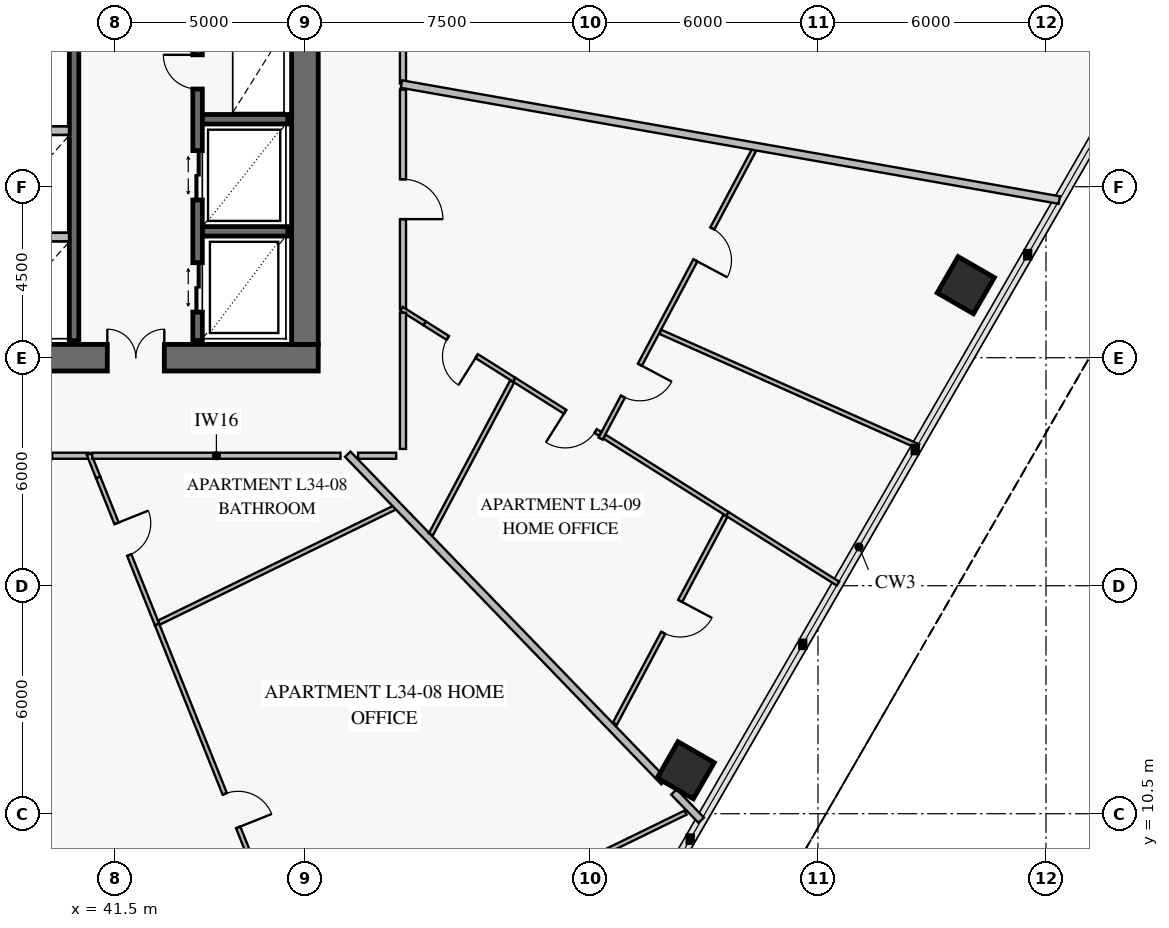
"""IFC4 building model, lengths in metres.
Left out: names, types, materials, properties, quantities, classifications, styles, units other than length and angle.
Written with IfcOpenShell. Run it as: python <this file> out.ifc"""

import sys

from ifc_helpers import new_model, si_unit, direction, frame, frame_2d, origin, origin_2d, place, context, subcontext, project, spatial, rectangle, extrude, element, fill, save


model = new_model("IFC4")
c1 = context("Model", 3, precision=1e-05, world=origin(), true_north=direction((0.0, 1.0)))
c2 = subcontext(c1, "Body", "Model", "MODEL_VIEW")
j1 = project(units=[si_unit("LENGTHUNIT", "METRE"), si_unit("PLANEANGLEUNIT", "RADIAN")], contexts=[c1])
p1 = place(None, origin())
s1 = spatial("IfcSite", under=j1, at=p1, CompositionType="ELEMENT")
p2 = place(p1, origin())
s2 = spatial("IfcBuilding", under=s1, at=p2, CompositionType="ELEMENT")
p3 = place(p2, frame((0.0, 0.0, 138.0)))
s3 = spatial("IfcBuildingStorey", under=s2, at=p3, CompositionType="ELEMENT", Elevation=138.0)
p4 = place(p3, frame((37.35, 22.5, 0.0), z_axis=(0.0, 0.0, 1.0), x_axis=(1.0, 0.0, 0.0)))
e1 = element("IfcWall", 1, at=p4, inside=s3, PredefinedType="SHEAR", context=c2, shape_type="SweptSolid", body=[
    extrude(rectangle(XDim=9.5, YDim=0.7, at=frame_2d((4.75, 0.0))), origin(), (0.0, 0.0, 1.0), 3.8),
])
p5 = place(p4, frame((3.95, 0.0, 0.0)))
e2 = element("IfcOpeningElement", 2, at=p5, cuts=e1, PredefinedType="OPENING", context=c2, shape_type="SweptSolid", body=[
    extrude(rectangle(XDim=1.5, YDim=2.15, at=frame_2d((0.75, 1.075))), frame((0.0, 0.362, 0.0), z_axis=(0.0, -1.0, 0.0), x_axis=(1.0, 0.0, 0.0)), (0.0, 0.0, 1.0), 0.724),
])
p6 = place(p3, frame((46.5, 22.85, 0.0), z_axis=(0.0, 0.0, 1.0), x_axis=(0.0, 1.0, 0.0)))
e3 = element("IfcWall", 3, at=p6, inside=s3, PredefinedType="SHEAR", context=c2, shape_type="SweptSolid", body=[
    extrude(rectangle(XDim=18.3, YDim=0.7, at=frame_2d((9.15, 0.0))), origin(), (0.0, 0.0, 1.0), 3.8),
])
p7 = place(p6, frame((8.9, 0.0, 0.0)))
e4 = element("IfcOpeningElement", 4, at=p7, cuts=e3, PredefinedType="OPENING", context=c2, shape_type="SweptSolid", body=[
    extrude(rectangle(XDim=1.1, YDim=2.15, at=frame_2d((0.55, 1.075))), frame((0.0, 0.362, 0.0), z_axis=(0.0, -1.0, 0.0), x_axis=(1.0, 0.0, 0.0)), (0.0, 0.0, 1.0), 0.724),
])
for number, where, z_axis, x_axis in (
    (5, (56.519, 11.643, 0.0), (0.0, 0.0, 1.0), (0.5, 0.866, 0.0)),
    (6, (63.889, 24.408, 0.0), (0.0, 0.0, 1.0), (0.5, 0.866, 0.0)),
):
    element("IfcColumn", number, at=place(p3, frame(where, z_axis=z_axis, x_axis=x_axis)), inside=s3, PredefinedType="COLUMN", context=c2, shape_type="SweptSolid", body=[
        extrude(rectangle(XDim=1.1, YDim=1.1, at=origin_2d()), origin(), (0.0, 0.0, 1.0), 3.55),
    ])
p8 = place(p3, frame((40.425, 22.95, 0.0), z_axis=(0.0, 0.0, 1.0), x_axis=(0.0, 1.0, 0.0)))
e7 = element("IfcWall", 7, at=p8, inside=s3, PredefinedType="SOLIDWALL", context=c2, shape_type="SweptSolid", body=[
    extrude(rectangle(XDim=8.2, YDim=0.25, at=frame_2d((4.1, 0.0))), origin(), (0.0, 0.0, 1.0), 3.8),
])
for number, where, z_axis, x_axis in (
    (8, (43.8, 25.825, 0.0), (0.0, 0.0, 1.0), (1.0, 0.0, 0.0)),
    (9, (43.8, 28.775, 0.0), (0.0, 0.0, 1.0), (1.0, 0.0, 0.0)),
):
    element("IfcWall", number, at=place(p3, frame(where, z_axis=z_axis, x_axis=x_axis)), inside=s3, PredefinedType="SOLIDWALL", context=c2, shape_type="SweptSolid", body=[
        extrude(rectangle(XDim=2.25, YDim=0.25, at=frame_2d((1.125, 0.0))), origin(), (0.0, 0.0, 1.0), 3.8),
    ])
p9 = place(p3, frame((43.675, 22.95, 0.0), z_axis=(0.0, 0.0, 1.0), x_axis=(0.0, 1.0, 0.0)))
e10 = element("IfcWall", 10, at=p9, inside=s3, PredefinedType="SOLIDWALL", context=c2, shape_type="SweptSolid", body=[
    extrude(rectangle(XDim=8.2, YDim=0.25, at=frame_2d((4.1, 0.0))), origin(), (0.0, 0.0, 1.0), 3.8),
])
p10 = place(p9, frame((0.75, 0.0, 0.0)))
e11 = element("IfcOpeningElement", 11, at=p10, cuts=e10, PredefinedType="OPENING", context=c2, shape_type="SweptSolid", body=[
    extrude(rectangle(XDim=1.3, YDim=2.3, at=frame_2d((0.65, 1.15))), frame((0.0, 0.137, 0.0), z_axis=(0.0, -1.0, 0.0), x_axis=(1.0, 0.0, 0.0)), (0.0, 0.0, 1.0), 0.274),
])
p11 = place(p9, frame((3.7, 0.0, 0.0)))
e12 = element("IfcOpeningElement", 12, at=p11, cuts=e10, PredefinedType="OPENING", context=c2, shape_type="SweptSolid", body=[
    extrude(rectangle(XDim=1.3, YDim=2.3, at=frame_2d((0.65, 1.15))), frame((0.0, 0.137, 0.0), z_axis=(0.0, -1.0, 0.0), x_axis=(1.0, 0.0, 0.0)), (0.0, 0.0, 1.0), 0.274),
])
p12 = place(p9, frame((6.62, 0.0, 0.0)))
e13 = element("IfcOpeningElement", 13, at=p12, cuts=e10, PredefinedType="OPENING", context=c2, shape_type="SweptSolid", body=[
    extrude(rectangle(XDim=0.9, YDim=2.1, at=frame_2d((0.45, 1.05))), frame((0.0, 0.137, 0.0), z_axis=(0.0, -1.0, 0.0), x_axis=(1.0, 0.0, 0.0)), (0.0, 0.0, 1.0), 0.274),
])
p13 = place(p3, frame((41.06, 19.35, 0.0), z_axis=(0.0, 0.0, 1.0), x_axis=(0.371320023402, -0.928504948948, 0.0)))
e14 = element("IfcWall", 14, at=p13, inside=s3, PredefinedType="PARTITIONING", context=c2, shape_type="SweptSolid", body=[
    extrude(rectangle(XDim=4.17, YDim=0.12, at=frame_2d((2.085, 0.0))), origin(), (0.0, 0.0, 1.0), 3.55),
])
p14 = place(p13, frame((1.302, 0.0, 0.0)))
e15 = element("IfcOpeningElement", 15, at=p14, cuts=e14, PredefinedType="OPENING", context=c2, shape_type="SweptSolid", body=[
    extrude(rectangle(XDim=0.9, YDim=2.1, at=frame_2d((0.45, 1.05))), frame((0.0, 0.072, 0.0), z_axis=(0.0, -1.0, 0.0), x_axis=(1.0, 0.0, 0.0)), (0.0, 0.0, 1.0), 0.144),
])
p15 = place(p3, frame((42.608, 15.478, 0.0), z_axis=(0.0, 0.0, 1.0), x_axis=(0.371370817249, -0.928484634281, 0.0)))
e16 = element("IfcWall", 16, at=p15, inside=s3, PredefinedType="PARTITIONING", context=c2, shape_type="SweptSolid", body=[
    extrude(rectangle(XDim=10.598, YDim=0.12, at=frame_2d((5.299, 0.0))), origin(), (0.0, 0.0, 1.0), 2.8),
])
p16 = place(p15, frame((4.799, 0.0, 0.0)))
e17 = element("IfcOpeningElement", 17, at=p16, cuts=e16, PredefinedType="OPENING", context=c2, shape_type="SweptSolid", body=[
    extrude(rectangle(XDim=0.95, YDim=2.1, at=frame_2d((0.475, 1.05))), frame((0.0, 0.072, 0.0), z_axis=(0.0, -1.0, 0.0), x_axis=(1.0, 0.0, 0.0)), (0.0, 0.0, 1.0), 0.144),
])
p17 = place(p3, frame((46.596, 5.691, 0.0), z_axis=(0.0, 0.0, 1.0), x_axis=(0.898799700949, 0.438359552848, 0.0)))
e18 = element("IfcWall", 18, at=p17, inside=s3, PredefinedType="PARTITIONING", context=c2, shape_type="SweptSolid", body=[
    extrude(rectangle(XDim=11.035, YDim=0.12, at=frame_2d((5.517, 0.0))), origin(), (0.0, 0.0, 1.0), 2.8),
])
p18 = place(p17, frame((4.958, 0.0, 0.0)))
e19 = element("IfcOpeningElement", 19, at=p18, cuts=e18, PredefinedType="OPENING", context=c2, shape_type="SweptSolid", body=[
    extrude(rectangle(XDim=0.95, YDim=2.1, at=frame_2d((0.475, 1.05))), frame((0.0, 0.072, 0.0), z_axis=(0.0, -1.0, 0.0), x_axis=(1.0, 0.0, 0.0)), (0.0, 0.0, 1.0), 0.144),
])
p19 = place(p3, frame((37.826, 19.92, 0.0), z_axis=(0.0, 0.0, 1.0), x_axis=(1.0, 0.0, 0.0)))
e20 = element("IfcWall", 20, at=p19, inside=s3, PredefinedType="PARTITIONING", context=c2, shape_type="SweptSolid", body=[
    extrude(rectangle(XDim=2.984, YDim=0.16, at=frame_2d((1.492, 0.0))), origin(), (0.0, 0.0, 1.0), 2.85),
])
p20 = place(p19, frame((0.967, 0.0, 0.0)))
e21 = element("IfcOpeningElement", 21, at=p20, cuts=e20, PredefinedType="OPENING", context=c2, shape_type="SweptSolid", body=[
    extrude(rectangle(XDim=1.05, YDim=2.15, at=frame_2d((0.525, 1.075))), frame((0.0, 0.092, 0.0), z_axis=(0.0, -1.0, 0.0), x_axis=(1.0, 0.0, 0.0)), (0.0, 0.0, 1.0), 0.184),
])
p21 = place(p3, frame((54.28, 20.371, 0.0), z_axis=(0.0, 0.0, 1.0), x_axis=(0.469462335531, 0.882952499015, 0.0)))
e22 = element("IfcWall", 22, at=p21, inside=s3, PredefinedType="PARTITIONING", context=c2, shape_type="SweptSolid", body=[
    extrude(rectangle(XDim=8.602, YDim=0.12, at=frame_2d((4.301, 0.0))), origin(), (0.0, 0.0, 1.0), 2.85),
])
p22 = place(p21, frame((1.252, 0.0, 0.0)))
e23 = element("IfcOpeningElement", 23, at=p22, cuts=e22, PredefinedType="OPENING", context=c2, shape_type="SweptSolid", body=[
    extrude(rectangle(XDim=0.95, YDim=2.1, at=frame_2d((0.475, 1.05))), frame((0.0, 0.072, 0.0), z_axis=(0.0, -1.0, 0.0), x_axis=(1.0, 0.0, 0.0)), (0.0, 0.0, 1.0), 0.144),
])
p23 = place(p21, frame((5.313, 0.0, 0.0)))
e24 = element("IfcOpeningElement", 24, at=p23, cuts=e22, PredefinedType="OPENING", context=c2, shape_type="SweptSolid", body=[
    extrude(rectangle(XDim=0.95, YDim=2.1, at=frame_2d((0.475, 1.05))), frame((0.0, 0.072, 0.0), z_axis=(0.0, -1.0, 0.0), x_axis=(1.0, 0.0, 0.0)), (0.0, 0.0, 1.0), 0.144),
])
p24 = place(p3, frame((49.65, 23.404, 0.0), z_axis=(0.0, 0.0, 1.0), x_axis=(0.846190371544, -0.532880713769, 0.0)))
e25 = element("IfcWall", 25, at=p24, inside=s3, PredefinedType="PARTITIONING", context=c2, shape_type="SweptSolid", body=[
    extrude(rectangle(XDim=2.784, YDim=0.12, at=frame_2d((1.392, 0.0))), origin(), (0.0, 0.0, 1.0), 3.55),
])
p25 = place(p24, frame((0.719, 0.0, 0.0)))
e26 = element("IfcOpeningElement", 26, at=p25, cuts=e25, PredefinedType="OPENING", context=c2, shape_type="SweptSolid", body=[
    extrude(rectangle(XDim=0.9, YDim=2.1, at=frame_2d((0.45, 1.05))), frame((0.0, 0.072, 0.0), z_axis=(0.0, -1.0, 0.0), x_axis=(1.0, 0.0, 0.0)), (0.0, 0.0, 1.0), 0.144),
])
p26 = place(p3, frame((52.006, 21.921, 0.0), z_axis=(0.0, 0.0, 1.0), x_axis=(0.846193199802, -0.532876222596, 0.0)))
e27 = element("IfcWall", 27, at=p26, inside=s3, PredefinedType="PARTITIONING", context=c2, shape_type="SweptSolid", body=[
    extrude(rectangle(XDim=2.674, YDim=0.12, at=frame_2d((1.337, 0.0))), origin(), (0.0, 0.0, 1.0), 3.1),
])
p27 = place(p26, frame((1.584, 0.0, 0.0)))
e28 = element("IfcOpeningElement", 28, at=p27, cuts=e27, PredefinedType="OPENING", context=c2, shape_type="SweptSolid", body=[
    extrude(rectangle(XDim=0.95, YDim=2.1, at=frame_2d((0.475, 1.05))), frame((0.0, 0.072, 0.0), z_axis=(0.0, -1.0, 0.0), x_axis=(1.0, 0.0, 0.0)), (0.0, 0.0, 1.0), 0.144),
])
p28 = place(p3, frame((54.384, 20.423, 0.0), z_axis=(0.0, 0.0, 1.0), x_axis=(0.846198695146, -0.532867496037, 0.0)))
e29 = element("IfcWall", 29, at=p28, inside=s3, PredefinedType="PARTITIONING", context=c2, shape_type="SweptSolid", body=[
    extrude(rectangle(XDim=3.821, YDim=0.12, at=frame_2d((1.911, 0.0))), origin(), (0.0, 0.0, 1.0), 3.55),
])
p29 = place(p3, frame((54.657, 12.872, 0.0), z_axis=(0.0, 0.0, 1.0), x_axis=(0.469450167382, 0.882958968664, 0.0)))
e30 = element("IfcWall", 30, at=p29, inside=s3, PredefinedType="PARTITIONING", context=c2, shape_type="SweptSolid", body=[
    extrude(rectangle(XDim=6.193, YDim=0.12, at=frame_2d((3.096, 0.0))), origin(), (0.0, 0.0, 1.0), 2.85),
])
p30 = place(p29, frame((2.706, 0.0, 0.0)))
e31 = element("IfcOpeningElement", 31, at=p30, cuts=e30, PredefinedType="OPENING", context=c2, shape_type="SweptSolid", body=[
    extrude(rectangle(XDim=0.95, YDim=2.1, at=frame_2d((0.475, 1.05))), frame((0.0, 0.072, 0.0), z_axis=(0.0, -1.0, 0.0), x_axis=(1.0, 0.0, 0.0)), (0.0, 0.0, 1.0), 0.144),
])
p31 = place(p3, frame((49.08, 23.787, 0.0), z_axis=(0.0, 0.0, 1.0), x_axis=(0.0, 1.0, 0.0)))
e32 = element("IfcWall", 32, at=p31, inside=s3, PredefinedType="PARTITIONING", context=c2, shape_type="SweptSolid", body=[
    extrude(rectangle(XDim=5.769, YDim=0.16, at=frame_2d((2.884, 0.0))), origin(), (0.0, 0.0, 1.0), 2.85),
])
p32 = place(p31, frame((2.359, 0.0, 0.0)))
e33 = element("IfcOpeningElement", 33, at=p32, cuts=e32, PredefinedType="OPENING", context=c2, shape_type="SweptSolid", body=[
    extrude(rectangle(XDim=1.05, YDim=2.15, at=frame_2d((0.525, 1.075))), frame((0.0, 0.092, 0.0), z_axis=(0.0, -1.0, 0.0), x_axis=(1.0, 0.0, 0.0)), (0.0, 0.0, 1.0), 0.184),
])
p33 = place(p3, frame((49.08, 29.714, 0.0), z_axis=(0.0, 0.0, 1.0), x_axis=(0.0, 1.0, 0.0)))
e34 = element("IfcWall", 34, at=p33, inside=s3, PredefinedType="PARTITIONING", context=c2, shape_type="SweptSolid", body=[
    extrude(rectangle(XDim=8.643, YDim=0.16, at=frame_2d((4.322, 0.0))), origin(), (0.0, 0.0, 1.0), 2.85),
])
p34 = place(p33, frame((3.747, 0.0, 0.0)))
e35 = element("IfcOpeningElement", 35, at=p34, cuts=e34, PredefinedType="OPENING", context=c2, shape_type="SweptSolid", body=[
    extrude(rectangle(XDim=1.15, YDim=2.2, at=frame_2d((0.575, 1.1))), frame((0.0, 0.092, 0.0), z_axis=(0.0, -1.0, 0.0), x_axis=(1.0, 0.0, 0.0)), (0.0, 0.0, 1.0), 0.184),
])
for number, where, z_axis, x_axis in (
    (36, (38.008, 25.675, 0.0), (0.0, 0.0, 1.0), (1.0, 0.0, 0.0)),
    (37, (38.008, 28.475, 0.0), (0.0, 0.0, 1.0), (1.0, 0.0, 0.0)),
):
    element("IfcWall", number, at=place(p3, frame(where, z_axis=z_axis, x_axis=x_axis)), inside=s3, PredefinedType="PARTITIONING", context=c2, shape_type="SweptSolid", body=[
        extrude(rectangle(XDim=2.284, YDim=0.22, at=frame_2d((1.142, 0.0))), origin(), (0.0, 0.0, 1.0), 3.55),
    ])
p35 = place(p3, frame((37.692, 19.96, 0.0), z_axis=(0.0, 0.0, 1.0), x_axis=(0.139170315648, -0.990268460188, 0.0)))
e38 = element("IfcWall", 38, at=p35, inside=s3, PredefinedType="PARTITIONING", context=c2, shape_type="SweptSolid", body=[
    extrude(rectangle(XDim=17.085, YDim=0.2, at=frame_2d((8.542, 0.0))), origin(), (0.0, 0.0, 1.0), 2.8),
])
p36 = place(p3, frame((40.814, 19.963, 0.0), z_axis=(0.0, 0.0, 1.0), x_axis=(0.371581909809, -0.928400174657, 0.0)))
e39 = element("IfcWall", 39, at=p36, inside=s3, PredefinedType="PARTITIONING", context=c2, shape_type="SweptSolid", body=[
    extrude(rectangle(XDim=0.66, YDim=0.12, at=frame_2d((0.33, 0.0))), origin(), (0.0, 0.0, 1.0), 3.55),
])
p37 = place(p3, frame((42.66, 15.531, 0.0), z_axis=(0.0, 0.0, 1.0), x_axis=(0.898796900982, 0.438365293773, 0.0)))
e40 = element("IfcWall", 40, at=p37, inside=s3, PredefinedType="PARTITIONING", context=c2, shape_type="SweptSolid", body=[
    extrude(rectangle(XDim=6.926, YDim=0.12, at=frame_2d((3.463, 0.0))), origin(), (0.0, 0.0, 1.0), 3.55),
])
p38 = place(p3, frame((47.627, 19.96, 0.0), z_axis=(0.0, 0.0, 1.0), x_axis=(0.694659610847, -0.719338602508, 0.0)))
e41 = element("IfcWall", 41, at=p38, inside=s3, PredefinedType="PARTITIONING", context=c2, shape_type="SweptSolid", body=[
    extrude(rectangle(XDim=11.98, YDim=0.2, at=frame_2d((5.99, 0.0))), origin(), (0.0, 0.0, 1.0), 2.8),
])
p39 = place(p3, frame((56.209, 11.073, 0.0), z_axis=(0.0, 0.0, 1.0), x_axis=(0.694716755503, -0.719283413977, 0.0)))
e42 = element("IfcWall", 42, at=p39, inside=s3, PredefinedType="PARTITIONING", context=c2, shape_type="SweptSolid", body=[
    extrude(rectangle(XDim=1.033, YDim=0.2, at=frame_2d((0.517, 0.0))), origin(), (0.0, 0.0, 1.0), 3.55),
])
p40 = place(p3, frame((55.851, 23.181, 0.0), z_axis=(0.0, 0.0, 1.0), x_axis=(0.913861683545, -0.406025643707, 0.0)))
e43 = element("IfcWall", 43, at=p40, inside=s3, PredefinedType="PARTITIONING", context=c2, shape_type="SweptSolid", body=[
    extrude(rectangle(XDim=7.429, YDim=0.12, at=frame_2d((3.714, 0.0))), origin(), (0.0, 0.0, 1.0), 2.8),
])
p41 = place(p3, frame((49.042, 23.787, 0.0), z_axis=(0.0, 0.0, 1.0), x_axis=(0.846312356727, -0.532686957651, 0.0)))
e44 = element("IfcWall", 44, at=p41, inside=s3, PredefinedType="PARTITIONING", context=c2, shape_type="SweptSolid", body=[
    extrude(rectangle(XDim=0.718, YDim=0.12, at=frame_2d((0.359, 0.0))), origin(), (0.0, 0.0, 1.0), 3.55),
])
p42 = place(p3, frame((57.618, 18.387, 0.0), z_axis=(0.0, 0.0, 1.0), x_axis=(0.846190145903, -0.532881072076, 0.0)))
e45 = element("IfcWall", 45, at=p42, inside=s3, PredefinedType="PARTITIONING", context=c2, shape_type="SweptSolid", body=[
    extrude(rectangle(XDim=3.438, YDim=0.12, at=frame_2d((1.719, 0.0))), origin(), (0.0, 0.0, 1.0), 2.8),
])
p43 = place(p3, frame((49.814, 17.851, 0.0), z_axis=(0.0, 0.0, 1.0), x_axis=(0.469430775165, 0.882969278813, 0.0)))
e46 = element("IfcWall", 46, at=p43, inside=s3, PredefinedType="PARTITIONING", context=c2, shape_type="SweptSolid", body=[
    extrude(rectangle(XDim=4.556, YDim=0.12, at=frame_2d((2.278, 0.0))), origin(), (0.0, 0.0, 1.0), 2.85),
])
p44 = place(p3, frame((49.04, 29.701, 0.0), z_axis=(0.0, 0.0, 1.0), x_axis=(0.98480788117, -0.173647450844, 0.0)))
e47 = element("IfcWall", 47, at=p44, inside=s3, PredefinedType="PARTITIONING", context=c2, shape_type="SweptSolid", body=[
    extrude(rectangle(XDim=17.576, YDim=0.2, at=frame_2d((8.788, 0.0))), origin(), (0.0, 0.0, 1.0), 2.8),
])
p45 = place(p3, frame((40.905, 19.92, 0.0), z_axis=(0.0, 0.0, 1.0), x_axis=(1.0, 0.0, 0.0)))
e48 = element("IfcWall", 48, at=p45, inside=s3, PredefinedType="PARTITIONING", context=c2, shape_type="SweptSolid", body=[
    extrude(rectangle(XDim=6.531, YDim=0.16, at=frame_2d((3.266, 0.0))), origin(), (0.0, 0.0, 1.0), 3.55),
])
p46 = place(p3, frame((49.08, 20.1, 0.0), z_axis=(0.0, 0.0, 1.0), x_axis=(0.0, 1.0, 0.0)))
e49 = element("IfcWall", 49, at=p46, inside=s3, PredefinedType="PARTITIONING", context=c2, shape_type="SweptSolid", body=[
    extrude(rectangle(XDim=3.583, YDim=0.16, at=frame_2d((1.792, 0.0))), origin(), (0.0, 0.0, 1.0), 3.55),
])
p47 = place(p3, frame((47.899, 19.92, 0.0), z_axis=(0.0, 0.0, 1.0), x_axis=(1.0, 0.0, 0.0)))
e50 = element("IfcWall", 50, at=p47, inside=s3, PredefinedType="PARTITIONING", context=c2, shape_type="SweptSolid", body=[
    extrude(rectangle(XDim=1.001, YDim=0.16, at=frame_2d((0.5, 0.0))), origin(), (0.0, 0.0, 1.0), 2.85),
])
p48 = place(p5, origin())
e51 = element("IfcDoor", 51, at=p48, inside=s3, OperationType="DOUBLE_DOOR_SINGLE_SWING", PredefinedType="DOOR", context=c2, shape_type="SweptSolid", body=[
    extrude(rectangle(XDim=1.5, YDim=2.15, at=frame_2d((0.75, 1.075))), frame((0.0, 0.025, 0.0), z_axis=(0.0, -1.0, 0.0), x_axis=(1.0, 0.0, 0.0)), (0.0, 0.0, 1.0), 0.05),
])
fill(e2, e51)
p49 = place(p10, origin())
e52 = element("IfcDoor", 52, at=p49, inside=s3, OperationType="DOUBLE_DOOR_SLIDING", PredefinedType="DOOR", context=c2, shape_type="SweptSolid", body=[
    extrude(rectangle(XDim=1.3, YDim=2.3, at=frame_2d((0.65, 1.15))), frame((0.0, 0.025, 0.0), z_axis=(0.0, -1.0, 0.0), x_axis=(1.0, 0.0, 0.0)), (0.0, 0.0, 1.0), 0.05),
])
fill(e11, e52)
p50 = place(p11, origin())
e53 = element("IfcDoor", 53, at=p50, inside=s3, OperationType="DOUBLE_DOOR_SLIDING", PredefinedType="DOOR", context=c2, shape_type="SweptSolid", body=[
    extrude(rectangle(XDim=1.3, YDim=2.3, at=frame_2d((0.65, 1.15))), frame((0.0, 0.025, 0.0), z_axis=(0.0, -1.0, 0.0), x_axis=(1.0, 0.0, 0.0)), (0.0, 0.0, 1.0), 0.05),
])
fill(e12, e53)
p51 = place(p12, origin())
e54 = element("IfcDoor", 54, at=p51, inside=s3, OperationType="SINGLE_SWING_RIGHT", PredefinedType="DOOR", context=c2, shape_type="SweptSolid", body=[
    extrude(rectangle(XDim=0.9, YDim=2.1, at=frame_2d((0.45, 1.05))), frame((0.0, 0.025, 0.0), z_axis=(0.0, -1.0, 0.0), x_axis=(1.0, 0.0, 0.0)), (0.0, 0.0, 1.0), 0.05),
])
fill(e13, e54)
p52 = place(p14, origin())
e55 = element("IfcDoor", 55, at=p52, inside=s3, OperationType="SINGLE_SWING_LEFT", PredefinedType="DOOR", context=c2, shape_type="SweptSolid", body=[
    extrude(rectangle(XDim=0.9, YDim=2.1, at=frame_2d((0.45, 1.05))), frame((0.0, 0.025, 0.0), z_axis=(0.0, -1.0, 0.0), x_axis=(1.0, 0.0, 0.0)), (0.0, 0.0, 1.0), 0.05),
])
fill(e15, e55)
p53 = place(p16, origin())
e56 = element("IfcDoor", 56, at=p53, inside=s3, OperationType="SINGLE_SWING_RIGHT", PredefinedType="DOOR", context=c2, shape_type="SweptSolid", body=[
    extrude(rectangle(XDim=0.95, YDim=2.1, at=frame_2d((0.475, 1.05))), frame((0.0, 0.025, 0.0), z_axis=(0.0, -1.0, 0.0), x_axis=(1.0, 0.0, 0.0)), (0.0, 0.0, 1.0), 0.05),
])
fill(e17, e56)
p54 = place(p22, frame((0.95, 0.0, 0.0), z_axis=(0.0, 0.0, 1.0), x_axis=(-1.0, 0.0, 0.0)))
e57 = element("IfcDoor", 57, at=p54, inside=s3, OperationType="SINGLE_SWING_LEFT", PredefinedType="DOOR", context=c2, shape_type="SweptSolid", body=[
    extrude(rectangle(XDim=0.95, YDim=2.1, at=frame_2d((0.475, 1.05))), frame((0.0, 0.025, 0.0), z_axis=(0.0, -1.0, 0.0), x_axis=(1.0, 0.0, 0.0)), (0.0, 0.0, 1.0), 0.05),
])
fill(e23, e57)
p55 = place(p23, frame((0.95, 0.0, 0.0), z_axis=(0.0, 0.0, 1.0), x_axis=(-1.0, 0.0, 0.0)))
e58 = element("IfcDoor", 58, at=p55, inside=s3, OperationType="SINGLE_SWING_RIGHT", PredefinedType="DOOR", context=c2, shape_type="SweptSolid", body=[
    extrude(rectangle(XDim=0.95, YDim=2.1, at=frame_2d((0.475, 1.05))), frame((0.0, 0.025, 0.0), z_axis=(0.0, -1.0, 0.0), x_axis=(1.0, 0.0, 0.0)), (0.0, 0.0, 1.0), 0.05),
])
fill(e24, e58)
p56 = place(p25, frame((0.9, 0.0, 0.0), z_axis=(0.0, 0.0, 1.0), x_axis=(-1.0, 0.0, 0.0)))
e59 = element("IfcDoor", 59, at=p56, inside=s3, OperationType="SINGLE_SWING_LEFT", PredefinedType="DOOR", context=c2, shape_type="SweptSolid", body=[
    extrude(rectangle(XDim=0.9, YDim=2.1, at=frame_2d((0.45, 1.05))), frame((0.0, 0.025, 0.0), z_axis=(0.0, -1.0, 0.0), x_axis=(1.0, 0.0, 0.0)), (0.0, 0.0, 1.0), 0.05),
])
fill(e26, e59)
p57 = place(p27, frame((0.95, 0.0, 0.0), z_axis=(0.0, 0.0, 1.0), x_axis=(-1.0, 0.0, 0.0)))
e60 = element("IfcDoor", 60, at=p57, inside=s3, OperationType="SINGLE_SWING_RIGHT", PredefinedType="DOOR", context=c2, shape_type="SweptSolid", body=[
    extrude(rectangle(XDim=0.95, YDim=2.1, at=frame_2d((0.475, 1.05))), frame((0.0, 0.025, 0.0), z_axis=(0.0, -1.0, 0.0), x_axis=(1.0, 0.0, 0.0)), (0.0, 0.0, 1.0), 0.05),
])
fill(e28, e60)
p58 = place(p30, frame((0.95, 0.0, 0.0), z_axis=(0.0, 0.0, 1.0), x_axis=(-1.0, 0.0, 0.0)))
e61 = element("IfcDoor", 61, at=p58, inside=s3, OperationType="SINGLE_SWING_LEFT", PredefinedType="DOOR", context=c2, shape_type="SweptSolid", body=[
    extrude(rectangle(XDim=0.95, YDim=2.1, at=frame_2d((0.475, 1.05))), frame((0.0, 0.025, 0.0), z_axis=(0.0, -1.0, 0.0), x_axis=(1.0, 0.0, 0.0)), (0.0, 0.0, 1.0), 0.05),
])
fill(e31, e61)
p59 = place(p32, frame((1.05, 0.0, 0.0), z_axis=(0.0, 0.0, 1.0), x_axis=(-1.0, 0.0, 0.0)))
e62 = element("IfcDoor", 62, at=p59, inside=s3, OperationType="SINGLE_SWING_RIGHT", PredefinedType="DOOR", context=c2, shape_type="SweptSolid", body=[
    extrude(rectangle(XDim=1.05, YDim=2.15, at=frame_2d((0.525, 1.075))), frame((0.0, 0.025, 0.0), z_axis=(0.0, -1.0, 0.0), x_axis=(1.0, 0.0, 0.0)), (0.0, 0.0, 1.0), 0.05),
])
fill(e33, e62)
save(model, sys.argv[1])
